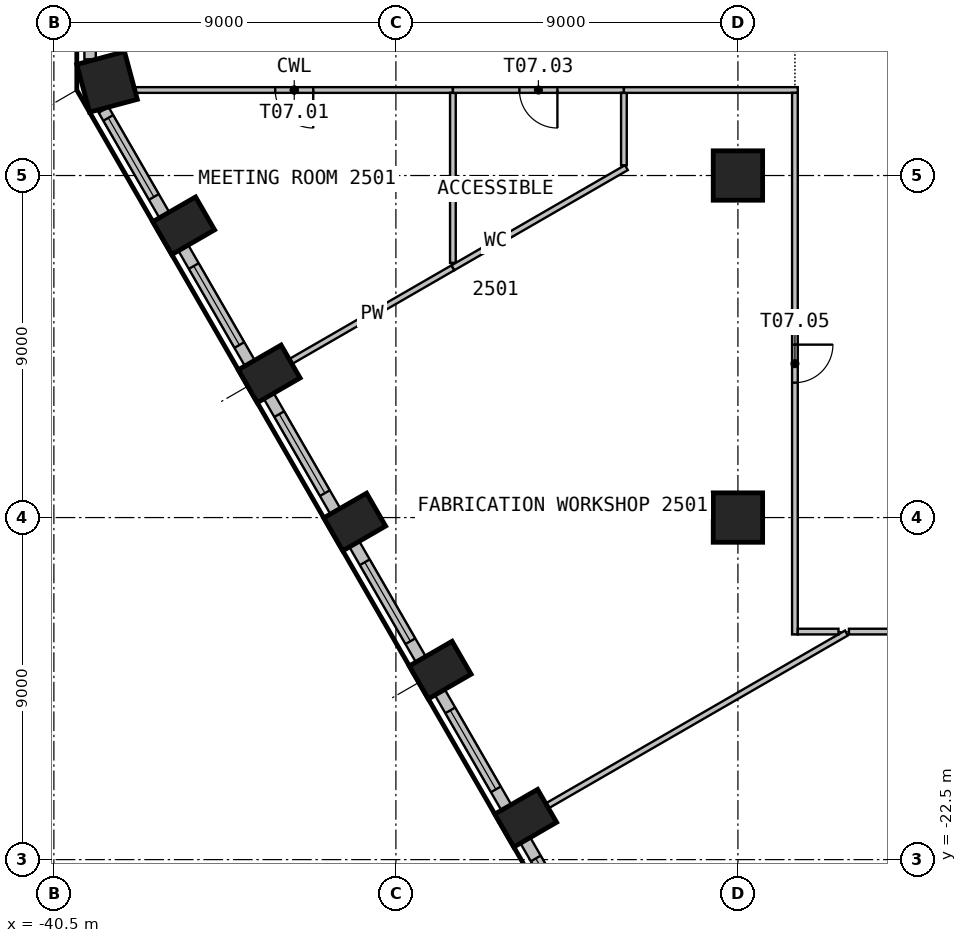
"""IFC4 building model, lengths in metres.
Left out: names, types, materials, properties, quantities, classifications, styles, units other than length and angle.
Written with IfcOpenShell. Run it as: python <this file> out.ifc"""

import sys

from ifc_helpers import new_model, si_unit, direction, frame, frame_2d, origin, origin_2d, place, context, subcontext, project, spatial, rectangle, circle, extrude, element, fill, save


model = new_model("IFC4")
c1 = context("Model", 3, precision=1e-05, world=origin(), true_north=direction((0.0, 1.0)))
c2 = subcontext(c1, "Body", "Model", "MODEL_VIEW")
j1 = project(units=[si_unit("LENGTHUNIT", "METRE"), si_unit("PLANEANGLEUNIT", "RADIAN")], contexts=[c1])
p1 = place(None, origin())
s1 = spatial("IfcSite", under=j1, at=p1, CompositionType="ELEMENT")
p2 = place(p1, origin())
s2 = spatial("IfcBuilding", under=s1, at=p2, CompositionType="ELEMENT")
p3 = place(p2, frame((0.0, 0.0, 104.7)))
s3 = spatial("IfcBuildingStorey", under=s2, at=p3, CompositionType="ELEMENT", Elevation=104.7)
p4 = place(p3, frame((-39.101, -2.037, 0.0), z_axis=(0.0, 0.0, 1.0), x_axis=(0.258819045103, -0.965925826289, 0.0)))
e1 = element("IfcColumn", 1, at=p4, inside=s3, PredefinedType="COLUMN", context=c2, shape_type="SweptSolid", body=[
    extrude(rectangle(XDim=1.3, YDim=1.3, at=origin_2d()), origin(), (0.0, 0.0, 1.0), 3.525),
])
for number, where, z_axis, x_axis in (
    (2, (-37.084, -5.822, 0.0), (0.0, 0.0, 1.0), (0.5, -0.866, 0.0)),
    (3, (-34.834, -9.719, 0.0), (0.0, 0.0, 1.0), (0.5, -0.866, 0.0)),
    (4, (-32.584, -13.616, 0.0), (0.0, 0.0, 1.0), (0.5, -0.866, 0.0)),
    (5, (-30.334, -17.513, 0.0), (0.0, 0.0, 1.0), (0.5, -0.866, 0.0)),
    (6, (-28.084, -21.411, 0.0), (0.0, 0.0, 1.0), (0.5, -0.866, 0.0)),
):
    element("IfcColumn", number, at=place(p3, frame(where, z_axis=z_axis, x_axis=x_axis)), inside=s3, PredefinedType="COLUMN", context=c2, shape_type="SweptSolid", body=[
        extrude(rectangle(XDim=1.0, YDim=1.3, at=origin_2d()), origin(), (0.0, 0.0, 1.0), 3.525),
    ])
for number, where, z_axis, x_axis in (
    (7, (-22.5, -13.5, 0.0), (0.0, 0.0, 1.0), (1.0, 0.0, 0.0)),
    (8, (-22.5, -4.5, 0.0), (0.0, 0.0, 1.0), (1.0, 0.0, 0.0)),
):
    element("IfcColumn", number, at=place(p3, frame(where, z_axis=z_axis, x_axis=x_axis)), inside=s3, PredefinedType="COLUMN", context=c2, shape_type="SweptSolid", body=[
        extrude(circle(Radius=0.65, at=origin_2d()), origin(), (0.0, 0.0, 1.0), 3.525),
    ])
p5 = place(p3, frame((-39.547, 1.443, 0.0), z_axis=(0.0, 0.0, 1.0), x_axis=(0.0, -1.0, 0.0)))
e9 = element("IfcWall", 9, at=p5, inside=s3, PredefinedType="SOLIDWALL", context=c2, shape_type="SweptSolid", body=[
    extrude(rectangle(XDim=2.886, YDim=0.3, at=frame_2d((1.443, 0.0))), origin(), (0.0, 0.0, 1.0), 3.525),
])
p6 = place(p5, frame((0.243, 0.0, 0.9)))
e10 = element("IfcOpeningElement", 10, at=p6, cuts=e9, PredefinedType="OPENING", context=c2, shape_type="SweptSolid", body=[
    extrude(rectangle(XDim=2.4, YDim=2.1, at=frame_2d((1.2, 1.05))), frame((0.0, 0.16, 0.0), z_axis=(0.0, -1.0, 0.0), x_axis=(1.0, 0.0, 0.0)), (0.0, 0.0, 1.0), 0.32),
])
p7 = place(p3, frame((-39.19, -2.774, 0.0), z_axis=(0.0, 0.0, 1.0), x_axis=(0.500004907028, -0.866022570692, 0.0)))
e11 = element("IfcWall", 11, at=p7, inside=s3, PredefinedType="SOLIDWALL", context=c2, shape_type="SweptSolid", body=[
    extrude(rectangle(XDim=3.192, YDim=0.3, at=frame_2d((1.596, 0.0))), origin(), (0.0, 0.0, 1.0), 3.525),
])
p8 = place(p7, frame((0.243, 0.0, 0.9)))
e12 = element("IfcOpeningElement", 12, at=p8, cuts=e11, PredefinedType="OPENING", context=c2, shape_type="SweptSolid", body=[
    extrude(rectangle(XDim=2.4, YDim=2.1, at=frame_2d((1.2, 1.05))), frame((0.0, 0.16, 0.0), z_axis=(0.0, -1.0, 0.0), x_axis=(1.0, 0.0, 0.0)), (0.0, 0.0, 1.0), 0.32),
])
p9 = place(p3, frame((-37.094, -6.406, 0.0), z_axis=(0.0, 0.0, 1.0), x_axis=(0.499996256241, -0.866027565234, 0.0)))
e13 = element("IfcWall", 13, at=p9, inside=s3, PredefinedType="SOLIDWALL", context=c2, shape_type="SweptSolid", body=[
    extrude(rectangle(XDim=3.499, YDim=0.3, at=frame_2d((1.75, 0.0))), origin(), (0.0, 0.0, 1.0), 3.525),
])
p10 = place(p9, frame((0.55, 0.0, 0.9)))
e14 = element("IfcOpeningElement", 14, at=p10, cuts=e13, PredefinedType="OPENING", context=c2, shape_type="SweptSolid", body=[
    extrude(rectangle(XDim=2.4, YDim=2.1, at=frame_2d((1.2, 1.05))), frame((0.0, 0.16, 0.0), z_axis=(0.0, -1.0, 0.0), x_axis=(1.0, 0.0, 0.0)), (0.0, 0.0, 1.0), 0.32),
])
p11 = place(p3, frame((-34.844, -10.303, 0.0), z_axis=(0.0, 0.0, 1.0), x_axis=(0.499996256241, -0.866027565234, 0.0)))
e15 = element("IfcWall", 15, at=p11, inside=s3, PredefinedType="SOLIDWALL", context=c2, shape_type="SweptSolid", body=[
    extrude(rectangle(XDim=3.499, YDim=0.3, at=frame_2d((1.75, 0.0))), origin(), (0.0, 0.0, 1.0), 3.525),
])
p12 = place(p11, frame((0.55, 0.0, 0.9)))
e16 = element("IfcOpeningElement", 16, at=p12, cuts=e15, PredefinedType="OPENING", context=c2, shape_type="SweptSolid", body=[
    extrude(rectangle(XDim=2.4, YDim=2.1, at=frame_2d((1.2, 1.05))), frame((0.0, 0.16, 0.0), z_axis=(0.0, -1.0, 0.0), x_axis=(1.0, 0.0, 0.0)), (0.0, 0.0, 1.0), 0.32),
])
p13 = place(p3, frame((-32.594, -14.2, 0.0), z_axis=(0.0, 0.0, 1.0), x_axis=(0.499996256241, -0.866027565234, 0.0)))
e17 = element("IfcWall", 17, at=p13, inside=s3, PredefinedType="SOLIDWALL", context=c2, shape_type="SweptSolid", body=[
    extrude(rectangle(XDim=3.499, YDim=0.3, at=frame_2d((1.75, 0.0))), origin(), (0.0, 0.0, 1.0), 3.525),
])
p14 = place(p13, frame((0.55, 0.0, 0.9)))
e18 = element("IfcOpeningElement", 18, at=p14, cuts=e17, PredefinedType="OPENING", context=c2, shape_type="SweptSolid", body=[
    extrude(rectangle(XDim=2.4, YDim=2.1, at=frame_2d((1.2, 1.05))), frame((0.0, 0.16, 0.0), z_axis=(0.0, -1.0, 0.0), x_axis=(1.0, 0.0, 0.0)), (0.0, 0.0, 1.0), 0.32),
])
p15 = place(p3, frame((-30.344, -18.097, 0.0), z_axis=(0.0, 0.0, 1.0), x_axis=(0.499996256241, -0.866027565234, 0.0)))
e19 = element("IfcWall", 19, at=p15, inside=s3, PredefinedType="SOLIDWALL", context=c2, shape_type="SweptSolid", body=[
    extrude(rectangle(XDim=3.499, YDim=0.3, at=frame_2d((1.75, 0.0))), origin(), (0.0, 0.0, 1.0), 3.525),
])
p16 = place(p15, frame((0.55, 0.0, 0.9)))
e20 = element("IfcOpeningElement", 20, at=p16, cuts=e19, PredefinedType="OPENING", context=c2, shape_type="SweptSolid", body=[
    extrude(rectangle(XDim=2.4, YDim=2.1, at=frame_2d((1.2, 1.05))), frame((0.0, 0.16, 0.0), z_axis=(0.0, -1.0, 0.0), x_axis=(1.0, 0.0, 0.0)), (0.0, 0.0, 1.0), 0.32),
])
p17 = place(p3, frame((-28.094, -21.994, 0.0), z_axis=(0.0, 0.0, 1.0), x_axis=(0.499996256241, -0.866027565234, 0.0)))
e21 = element("IfcWall", 21, at=p17, inside=s3, PredefinedType="SOLIDWALL", context=c2, shape_type="SweptSolid", body=[
    extrude(rectangle(XDim=3.499, YDim=0.3, at=frame_2d((1.75, 0.0))), origin(), (0.0, 0.0, 1.0), 3.525),
])
p18 = place(p17, frame((0.55, 0.0, 0.9)))
e22 = element("IfcOpeningElement", 22, at=p18, cuts=e21, PredefinedType="OPENING", context=c2, shape_type="SweptSolid", body=[
    extrude(rectangle(XDim=2.4, YDim=2.1, at=frame_2d((1.2, 1.05))), frame((0.0, 0.16, 0.0), z_axis=(0.0, -1.0, 0.0), x_axis=(1.0, 0.0, 0.0)), (0.0, 0.0, 1.0), 0.32),
])
p19 = place(p3, frame((-30.0, -2.25, 0.0), z_axis=(0.0, 0.0, 1.0), x_axis=(-1.0, 0.0, 0.0)))
e23 = element("IfcWall", 23, at=p19, inside=s3, PredefinedType="PARTITIONING", context=c2, shape_type="SweptSolid", body=[
    extrude(rectangle(XDim=8.35, YDim=0.15, at=frame_2d((4.175, 0.0))), origin(), (0.0, 0.0, 1.0), 3.525),
])
p20 = place(p19, frame((3.675, 0.0, 0.0)))
e24 = element("IfcOpeningElement", 24, at=p20, cuts=e23, PredefinedType="OPENING", context=c2, shape_type="SweptSolid", body=[
    extrude(rectangle(XDim=1.0, YDim=2.1, at=frame_2d((0.5, 1.05))), frame((0.0, 0.085, 0.0), z_axis=(0.0, -1.0, 0.0), x_axis=(1.0, 0.0, 0.0)), (0.0, 0.0, 1.0), 0.17),
])
p21 = place(p3, frame((-30.0, -6.928, 0.0), z_axis=(0.0, 0.0, 1.0), x_axis=(-0.865998524286, -0.500046553767, 0.0)))
e25 = element("IfcWall", 25, at=p21, inside=s3, PredefinedType="PARTITIONING", context=c2, shape_type="SweptSolid", body=[
    extrude(rectangle(XDim=4.912, YDim=0.15, at=frame_2d((2.456, 0.0))), origin(), (0.0, 0.0, 1.0), 3.525),
])
p22 = place(p3, frame((-30.0, -2.325, 0.0), z_axis=(0.0, 0.0, 1.0), x_axis=(0.0, -1.0, 0.0)))
e26 = element("IfcWall", 26, at=p22, inside=s3, PredefinedType="PARTITIONING", context=c2, shape_type="SweptSolid", body=[
    extrude(rectangle(XDim=4.473, YDim=0.15, at=frame_2d((2.237, 0.0))), origin(), (0.0, 0.0, 1.0), 3.525),
])
p23 = place(p3, frame((-25.435, -4.292, 0.0), z_axis=(0.0, 0.0, 1.0), x_axis=(-0.866031326857, -0.499989740797, 0.0)))
e27 = element("IfcWall", 27, at=p23, inside=s3, PredefinedType="PARTITIONING", context=c2, shape_type="SweptSolid", body=[
    extrude(rectangle(XDim=5.271, YDim=0.15, at=frame_2d((2.635, 0.0))), origin(), (0.0, 0.0, 1.0), 3.525),
])
p24 = place(p3, frame((-25.5, -2.25, 0.0), z_axis=(0.0, 0.0, 1.0), x_axis=(-1.0, 0.0, 0.0)))
e28 = element("IfcWall", 28, at=p24, inside=s3, PredefinedType="PARTITIONING", context=c2, shape_type="SweptSolid", body=[
    extrude(rectangle(XDim=4.5, YDim=0.15, at=frame_2d((2.25, 0.0))), origin(), (0.0, 0.0, 1.0), 3.525),
])
p25 = place(p24, frame((1.75, 0.0, 0.0)))
e29 = element("IfcOpeningElement", 29, at=p25, cuts=e28, PredefinedType="OPENING", context=c2, shape_type="SweptSolid", body=[
    extrude(rectangle(XDim=1.0, YDim=2.1, at=frame_2d((0.5, 1.05))), frame((0.0, 0.085, 0.0), z_axis=(0.0, -1.0, 0.0), x_axis=(1.0, 0.0, 0.0)), (0.0, 0.0, 1.0), 0.17),
])
p26 = place(p3, frame((-19.644, -16.538, 0.0), z_axis=(0.0, 0.0, 1.0), x_axis=(-0.866004606565, -0.500036020111, 0.0)))
e30 = element("IfcWall", 30, at=p26, inside=s3, PredefinedType="PARTITIONING", context=c2, shape_type="SweptSolid", body=[
    extrude(rectangle(XDim=9.076, YDim=0.15, at=frame_2d((4.538, 0.0))), origin(), (0.0, 0.0, 1.0), 3.525),
])
p27 = place(p3, frame((-25.5, -2.325, 0.0), z_axis=(0.0, 0.0, 1.0), x_axis=(0.0, -1.0, 0.0)))
e31 = element("IfcWall", 31, at=p27, inside=s3, PredefinedType="PARTITIONING", context=c2, shape_type="SweptSolid", body=[
    extrude(rectangle(XDim=1.905, YDim=0.15, at=frame_2d((0.953, 0.0))), origin(), (0.0, 0.0, 1.0), 3.525),
])
p28 = place(p3, frame((-20.925, -2.25, 0.0), z_axis=(0.0, 0.0, 1.0), x_axis=(-1.0, 0.0, 0.0)))
e32 = element("IfcWall", 32, at=p28, inside=s3, PredefinedType="PARTITIONING", context=c2, shape_type="SweptSolid", body=[
    extrude(rectangle(XDim=4.575, YDim=0.15, at=frame_2d((2.288, 0.0))), origin(), (0.0, 0.0, 1.0), 3.525),
])
p29 = place(p3, frame((-21.0, -2.325, 0.0), z_axis=(0.0, 0.0, 1.0), x_axis=(0.0, -1.0, 0.0)))
e33 = element("IfcWall", 33, at=p29, inside=s3, PredefinedType="PARTITIONING", context=c2, shape_type="SweptSolid", body=[
    extrude(rectangle(XDim=14.25, YDim=0.15, at=frame_2d((7.125, 0.0))), origin(), (0.0, 0.0, 1.0), 3.525),
])
p30 = place(p29, frame((6.625, 0.0, 0.0)))
e34 = element("IfcOpeningElement", 34, at=p30, cuts=e33, PredefinedType="OPENING", context=c2, shape_type="SweptSolid", body=[
    extrude(rectangle(XDim=1.0, YDim=2.1, at=frame_2d((0.5, 1.05))), frame((0.0, 0.085, 0.0), z_axis=(0.0, -1.0, 0.0), x_axis=(1.0, 0.0, 0.0)), (0.0, 0.0, 1.0), 0.17),
])
p31 = place(p3, frame((-20.925, -16.5, 0.0), z_axis=(0.0, 0.0, 1.0), x_axis=(1.0, 0.0, 0.0)))
e35 = element("IfcWall", 35, at=p31, inside=s3, PredefinedType="PARTITIONING", context=c2, shape_type="SweptSolid", body=[
    extrude(rectangle(XDim=1.071, YDim=0.15, at=frame_2d((0.536, 0.0))), origin(), (0.0, 0.0, 1.0), 3.525),
])
p32 = place(p3, frame((-19.579, -16.5, 0.0), z_axis=(0.0, 0.0, 1.0), x_axis=(1.0, 0.0, 0.0)))
e36 = element("IfcWall", 36, at=p32, inside=s3, PredefinedType="PARTITIONING", context=c2, shape_type="SweptSolid", body=[
    extrude(rectangle(XDim=8.329, YDim=0.15, at=frame_2d((4.165, 0.0))), origin(), (0.0, 0.0, 1.0), 3.525),
])
p33 = place(p8, origin())
e37 = element("IfcWindow", 37, at=p33, inside=s3, PartitioningType="SINGLE_PANEL", PredefinedType="WINDOW", context=c2, shape_type="SweptSolid", body=[
    extrude(rectangle(XDim=2.4, YDim=2.1, at=frame_2d((1.2, 1.05))), frame((0.0, 0.03, 0.0), z_axis=(0.0, -1.0, 0.0), x_axis=(1.0, 0.0, 0.0)), (0.0, 0.0, 1.0), 0.06),
])
fill(e12, e37)
p34 = place(p10, origin())
e38 = element("IfcWindow", 38, at=p34, inside=s3, PartitioningType="SINGLE_PANEL", PredefinedType="WINDOW", context=c2, shape_type="SweptSolid", body=[
    extrude(rectangle(XDim=2.4, YDim=2.1, at=frame_2d((1.2, 1.05))), frame((0.0, 0.03, 0.0), z_axis=(0.0, -1.0, 0.0), x_axis=(1.0, 0.0, 0.0)), (0.0, 0.0, 1.0), 0.06),
])
fill(e14, e38)
p35 = place(p12, origin())
e39 = element("IfcWindow", 39, at=p35, inside=s3, PartitioningType="SINGLE_PANEL", PredefinedType="WINDOW", context=c2, shape_type="SweptSolid", body=[
    extrude(rectangle(XDim=2.4, YDim=2.1, at=frame_2d((1.2, 1.05))), frame((0.0, 0.03, 0.0), z_axis=(0.0, -1.0, 0.0), x_axis=(1.0, 0.0, 0.0)), (0.0, 0.0, 1.0), 0.06),
])
fill(e16, e39)
p36 = place(p14, origin())
e40 = element("IfcWindow", 40, at=p36, inside=s3, PartitioningType="SINGLE_PANEL", PredefinedType="WINDOW", context=c2, shape_type="SweptSolid", body=[
    extrude(rectangle(XDim=2.4, YDim=2.1, at=frame_2d((1.2, 1.05))), frame((0.0, 0.03, 0.0), z_axis=(0.0, -1.0, 0.0), x_axis=(1.0, 0.0, 0.0)), (0.0, 0.0, 1.0), 0.06),
])
fill(e18, e40)
p37 = place(p16, origin())
e41 = element("IfcWindow", 41, at=p37, inside=s3, PartitioningType="SINGLE_PANEL", PredefinedType="WINDOW", context=c2, shape_type="SweptSolid", body=[
    extrude(rectangle(XDim=2.4, YDim=2.1, at=frame_2d((1.2, 1.05))), frame((0.0, 0.03, 0.0), z_axis=(0.0, -1.0, 0.0), x_axis=(1.0, 0.0, 0.0)), (0.0, 0.0, 1.0), 0.06),
])
fill(e20, e41)
p38 = place(p18, origin())
e42 = element("IfcWindow", 42, at=p38, inside=s3, PartitioningType="SINGLE_PANEL", PredefinedType="WINDOW", context=c2, shape_type="SweptSolid", body=[
    extrude(rectangle(XDim=2.4, YDim=2.1, at=frame_2d((1.2, 1.05))), frame((0.0, 0.03, 0.0), z_axis=(0.0, -1.0, 0.0), x_axis=(1.0, 0.0, 0.0)), (0.0, 0.0, 1.0), 0.06),
])
fill(e22, e42)
p39 = place(p20, origin())
e43 = element("IfcDoor", 43, at=p39, inside=s3, OperationType="SINGLE_SWING_RIGHT", PredefinedType="DOOR", context=c2, shape_type="SweptSolid", body=[
    extrude(rectangle(XDim=1.0, YDim=2.1, at=frame_2d((0.5, 1.05))), frame((0.0, 0.025, 0.0), z_axis=(0.0, -1.0, 0.0), x_axis=(1.0, 0.0, 0.0)), (0.0, 0.0, 1.0), 0.05),
])
fill(e24, e43)
p40 = place(p25, origin())
e44 = element("IfcDoor", 44, at=p40, inside=s3, OperationType="SINGLE_SWING_RIGHT", PredefinedType="DOOR", context=c2, shape_type="SweptSolid", body=[
    extrude(rectangle(XDim=1.0, YDim=2.1, at=frame_2d((0.5, 1.05))), frame((0.0, 0.025, 0.0), z_axis=(0.0, -1.0, 0.0), x_axis=(1.0, 0.0, 0.0)), (0.0, 0.0, 1.0), 0.05),
])
fill(e29, e44)
p41 = place(p30, origin())
e45 = element("IfcDoor", 45, at=p41, inside=s3, OperationType="SINGLE_SWING_RIGHT", PredefinedType="DOOR", context=c2, shape_type="SweptSolid", body=[
    extrude(rectangle(XDim=1.0, YDim=2.1, at=frame_2d((0.5, 1.05))), frame((0.0, 0.025, 0.0), z_axis=(0.0, -1.0, 0.0), x_axis=(1.0, 0.0, 0.0)), (0.0, 0.0, 1.0), 0.05),
])
fill(e34, e45)
save(model, sys.argv[1])
